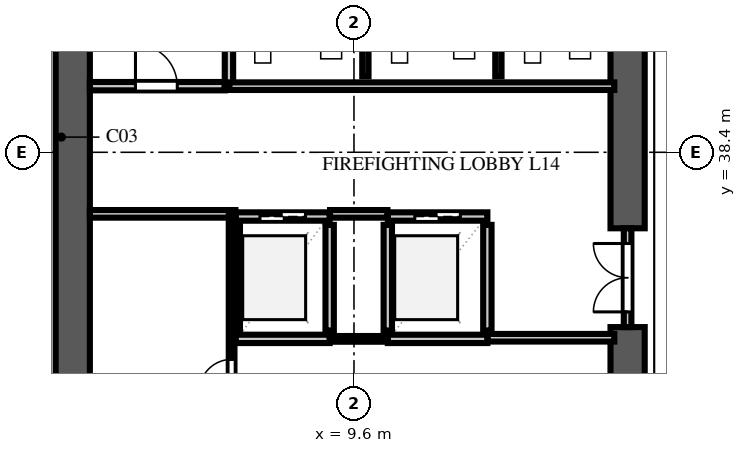
"""IFC4 building model, lengths in metres.
Left out: names, types, materials, properties, quantities, classifications, styles, units other than length and angle.
Written with IfcOpenShell. Run it as: python <this file> out.ifc"""

import sys

from ifc_helpers import new_model, si_unit, direction, frame, frame_2d, origin, place, context, subcontext, project, spatial, rectangle, extrude, element, fill, save


model = new_model("IFC4")
c1 = context("Model", 3, precision=1e-05, world=origin(), true_north=direction((0.0, 1.0)))
c2 = subcontext(c1, "Body", "Model", "MODEL_VIEW")
j1 = project(units=[si_unit("LENGTHUNIT", "METRE"), si_unit("PLANEANGLEUNIT", "RADIAN")], contexts=[c1])
p1 = place(None, origin())
s1 = spatial("IfcSite", under=j1, at=p1, CompositionType="ELEMENT")
p2 = place(p1, origin())
s2 = spatial("IfcBuilding", under=s1, at=p2, CompositionType="ELEMENT")
p3 = place(p2, frame((0.0, 0.0, 58.4)))
s3 = spatial("IfcBuildingStorey", under=s2, at=p3, CompositionType="ELEMENT", Elevation=58.4)
p4 = place(p3, frame((2.2, 9.15, 0.0), z_axis=(0.0, 0.0, 1.0), x_axis=(0.0, 1.0, 0.0)))
e1 = element("IfcWall", 1, at=p4, inside=s3, PredefinedType="SHEAR", context=c2, shape_type="SweptSolid", body=[
    extrude(rectangle(XDim=39.3, YDim=0.9, at=frame_2d((19.65, 0.0))), origin(), (0.0, 0.0, 1.0), 3.54),
])
p5 = place(p3, frame((16.8, 26.0, 0.0), z_axis=(0.0, 0.0, 1.0), x_axis=(0.0, 1.0, 0.0)))
e2 = element("IfcWall", 2, at=p5, inside=s3, PredefinedType="SHEAR", context=c2, shape_type="SweptSolid", body=[
    extrude(rectangle(XDim=7.8, YDim=0.9, at=frame_2d((3.9, 0.0))), origin(), (0.0, 0.0, 1.0), 3.54),
])
p6 = place(p3, frame((16.8, 36.4, 0.0), z_axis=(0.0, 0.0, 1.0), x_axis=(0.0, 1.0, 0.0)))
e3 = element("IfcWall", 3, at=p6, inside=s3, PredefinedType="SHEAR", context=c2, shape_type="SweptSolid", body=[
    extrude(rectangle(XDim=11.15, YDim=0.9, at=frame_2d((5.575, 0.0))), origin(), (0.0, 0.0, 1.0), 3.54),
])
p7 = place(p6, frame((9.2, 0.0, 0.0)))
e4 = element("IfcOpeningElement", 4, at=p7, cuts=e3, PredefinedType="OPENING", context=c2, shape_type="SweptSolid", body=[
    extrude(rectangle(XDim=0.95, YDim=2.15, at=frame_2d((0.475, 1.075))), frame((0.0, 0.462, 0.0), z_axis=(0.0, -1.0, 0.0), x_axis=(1.0, 0.0, 0.0)), (0.0, 0.0, 1.0), 0.924),
])
p8 = place(p3, frame((2.65, 40.14, 0.0), z_axis=(0.0, 0.0, 1.0), x_axis=(1.0, 0.0, 0.0)))
e5 = element("IfcWall", 5, at=p8, inside=s3, PredefinedType="SOLIDWALL", context=c2, shape_type="SweptSolid", body=[
    extrude(rectangle(XDim=3.55, YDim=0.22, at=frame_2d((1.775, 0.0))), origin(), (0.0, 0.0, 1.0), 3.54),
])
p9 = place(p8, frame((1.2, 0.0, 0.0)))
e6 = element("IfcOpeningElement", 6, at=p9, cuts=e5, PredefinedType="OPENING", context=c2, shape_type="SweptSolid", body=[
    extrude(rectangle(XDim=1.1, YDim=2.2, at=frame_2d((0.55, 1.1))), frame((0.0, 0.122, 0.0), z_axis=(0.0, -1.0, 0.0), x_axis=(1.0, 0.0, 0.0)), (0.0, 0.0, 1.0), 0.244),
])
p10 = place(p3, frame((6.31, 40.14, 0.0), z_axis=(0.0, 0.0, 1.0), x_axis=(0.0, 1.0, 0.0)))
e7 = element("IfcWall", 7, at=p10, inside=s3, PredefinedType="SOLIDWALL", context=c2, shape_type="SweptSolid", body=[
    extrude(rectangle(XDim=7.81, YDim=0.22, at=frame_2d((3.905, 0.0))), origin(), (0.0, 0.0, 1.0), 3.54),
])
for number, where, z_axis, x_axis in (
    (8, (6.49, 33.71, 0.0), (0.0, 0.0, 1.0), (0.0, 1.0, 0.0)),
    (9, (8.96, 33.71, 0.0), (0.0, 0.0, 1.0), (0.0, 1.0, 0.0)),
):
    element("IfcWall", number, at=place(p3, frame(where, z_axis=z_axis, x_axis=x_axis)), inside=s3, PredefinedType="SOLIDWALL", context=c2, shape_type="SweptSolid", body=[
        extrude(rectangle(XDim=2.78, YDim=0.22, at=frame_2d((1.39, 0.0))), origin(), (0.0, 0.0, 1.0), 3.54),
    ])
p11 = place(p3, frame((6.49, 33.49, 0.0), z_axis=(0.0, 0.0, 1.0), x_axis=(1.0, 0.0, 0.0)))
e10 = element("IfcWall", 10, at=p11, inside=s3, PredefinedType="SOLIDWALL", context=c2, shape_type="SweptSolid", body=[
    extrude(rectangle(XDim=2.47, YDim=0.22, at=frame_2d((1.235, 0.0))), origin(), (0.0, 0.0, 1.0), 3.54),
])
p12 = place(p3, frame((6.49, 36.71, 0.0), z_axis=(0.0, 0.0, 1.0), x_axis=(1.0, 0.0, 0.0)))
e11 = element("IfcWall", 11, at=p12, inside=s3, PredefinedType="SOLIDWALL", context=c2, shape_type="SweptSolid", body=[
    extrude(rectangle(XDim=2.47, YDim=0.22, at=frame_2d((1.235, 0.0))), origin(), (0.0, 0.0, 1.0), 3.54),
])
p13 = place(p12, frame((0.635, 0.0, 0.0)))
e12 = element("IfcOpeningElement", 12, at=p13, cuts=e11, PredefinedType="OPENING", context=c2, shape_type="SweptSolid", body=[
    extrude(rectangle(XDim=1.2, YDim=2.2, at=frame_2d((0.6, 1.1))), frame((0.0, 0.122, 0.0), z_axis=(0.0, -1.0, 0.0), x_axis=(1.0, 0.0, 0.0)), (0.0, 0.0, 1.0), 0.244),
])
for number, where, z_axis, x_axis in (
    (13, (10.49, 33.71, 0.0), (0.0, 0.0, 1.0), (0.0, 1.0, 0.0)),
    (14, (13.11, 33.71, 0.0), (0.0, 0.0, 1.0), (0.0, 1.0, 0.0)),
):
    element("IfcWall", number, at=place(p3, frame(where, z_axis=z_axis, x_axis=x_axis)), inside=s3, PredefinedType="SOLIDWALL", context=c2, shape_type="SweptSolid", body=[
        extrude(rectangle(XDim=2.78, YDim=0.22, at=frame_2d((1.39, 0.0))), origin(), (0.0, 0.0, 1.0), 3.54),
    ])
p14 = place(p3, frame((10.49, 33.49, 0.0), z_axis=(0.0, 0.0, 1.0), x_axis=(1.0, 0.0, 0.0)))
e15 = element("IfcWall", 15, at=p14, inside=s3, PredefinedType="SOLIDWALL", context=c2, shape_type="SweptSolid", body=[
    extrude(rectangle(XDim=2.62, YDim=0.22, at=frame_2d((1.31, 0.0))), origin(), (0.0, 0.0, 1.0), 3.54),
])
p15 = place(p3, frame((10.49, 36.71, 0.0), z_axis=(0.0, 0.0, 1.0), x_axis=(1.0, 0.0, 0.0)))
e16 = element("IfcWall", 16, at=p15, inside=s3, PredefinedType="SOLIDWALL", context=c2, shape_type="SweptSolid", body=[
    extrude(rectangle(XDim=2.62, YDim=0.22, at=frame_2d((1.31, 0.0))), origin(), (0.0, 0.0, 1.0), 3.54),
])
p16 = place(p15, frame((0.71, 0.0, 0.0)))
e17 = element("IfcOpeningElement", 17, at=p16, cuts=e16, PredefinedType="OPENING", context=c2, shape_type="SweptSolid", body=[
    extrude(rectangle(XDim=1.2, YDim=2.2, at=frame_2d((0.6, 1.1))), frame((0.0, 0.122, 0.0), z_axis=(0.0, -1.0, 0.0), x_axis=(1.0, 0.0, 0.0)), (0.0, 0.0, 1.0), 0.244),
])
p17 = place(p3, frame((2.65, 36.78, 0.0), z_axis=(0.0, 0.0, 1.0), x_axis=(1.0, 0.0, 0.0)))
e18 = element("IfcWall", 18, at=p17, inside=s3, PredefinedType="SOLIDWALL", context=c2, shape_type="SweptSolid", body=[
    extrude(rectangle(XDim=3.83, YDim=0.2, at=frame_2d((1.915, 0.0))), origin(), (0.0, 0.0, 1.0), 3.54),
])
p18 = place(p3, frame((8.97, 36.78, 0.0), z_axis=(0.0, 0.0, 1.0), x_axis=(1.0, 0.0, 0.0)))
e19 = element("IfcWall", 19, at=p18, inside=s3, PredefinedType="SOLIDWALL", context=c2, shape_type="SweptSolid", body=[
    extrude(rectangle(XDim=1.51, YDim=0.2, at=frame_2d((0.755, 0.0))), origin(), (0.0, 0.0, 1.0), 3.54),
])
p19 = place(p3, frame((13.12, 33.52, 0.0), z_axis=(0.0, 0.0, 1.0), x_axis=(1.0, 0.0, 0.0)))
e20 = element("IfcWall", 20, at=p19, inside=s3, PredefinedType="SOLIDWALL", context=c2, shape_type="SweptSolid", body=[
    extrude(rectangle(XDim=3.33, YDim=0.2, at=frame_2d((1.665, 0.0))), origin(), (0.0, 0.0, 1.0), 3.54),
])
p20 = place(p3, frame((6.32, 40.14, 0.0), z_axis=(0.0, 0.0, 1.0), x_axis=(1.0, 0.0, 0.0)))
e21 = element("IfcWall", 21, at=p20, inside=s3, PredefinedType="SOLIDWALL", context=c2, shape_type="SweptSolid", body=[
    extrude(rectangle(XDim=10.13, YDim=0.2, at=frame_2d((5.065, 0.0))), origin(), (0.0, 0.0, 1.0), 3.54),
])
p21 = place(p3, frame((16.8, 33.8, 0.0), z_axis=(0.0, 0.0, 1.0), x_axis=(0.0, 1.0, 0.0)))
e22 = element("IfcWall", 22, at=p21, inside=s3, PredefinedType="SOLIDWALL", context=c2, shape_type="SweptSolid", body=[
    extrude(rectangle(XDim=2.6, YDim=0.2, at=frame_2d((1.3, 0.0))), origin(), (0.0, 0.0, 1.0), 3.54),
])
p22 = place(p21, frame((0.4, 0.0, 0.0)))
e23 = element("IfcOpeningElement", 23, at=p22, cuts=e22, PredefinedType="OPENING", context=c2, shape_type="SweptSolid", body=[
    extrude(rectangle(XDim=1.8, YDim=2.2, at=frame_2d((0.9, 1.1))), frame((0.0, 0.112, 0.0), z_axis=(0.0, -1.0, 0.0), x_axis=(1.0, 0.0, 0.0)), (0.0, 0.0, 1.0), 0.224),
])
p23 = place(p3, frame((8.965, 33.49, 0.0), z_axis=(0.0, 0.0, 1.0), x_axis=(1.0, 0.0, 0.0)))
e24 = element("IfcWall", 24, at=p23, inside=s3, PredefinedType="PARTITIONING", context=c2, shape_type="SweptSolid", body=[
    extrude(rectangle(XDim=1.52, YDim=0.15, at=frame_2d((0.76, 0.0))), origin(), (0.0, 0.0, 1.0), 3.54),
])
p24 = place(p3, frame((6.38, 17.8, 0.0), z_axis=(0.0, 0.0, 1.0), x_axis=(0.0, 1.0, 0.0)))
e25 = element("IfcWall", 25, at=p24, inside=s3, PredefinedType="PARTITIONING", context=c2, shape_type="SweptSolid", body=[
    extrude(rectangle(XDim=18.98, YDim=0.15, at=frame_2d((9.49, 0.0))), origin(), (0.0, 0.0, 1.0), 3.54),
])
p25 = place(p24, frame((14.3, 0.0, 0.0)))
e26 = element("IfcOpeningElement", 26, at=p25, cuts=e25, PredefinedType="OPENING", context=c2, shape_type="SweptSolid", body=[
    extrude(rectangle(XDim=0.85, YDim=2.1, at=frame_2d((0.425, 1.05))), frame((0.0, 0.087, 0.0), z_axis=(0.0, -1.0, 0.0), x_axis=(1.0, 0.0, 0.0)), (0.0, 0.0, 1.0), 0.174),
])
for number, where, z_axis, x_axis in (
    (27, (9.9, 40.4, 0.0), (0.0, 0.0, 1.0), (0.0, 1.0, 0.0)),
    (28, (13.4, 40.4, 0.0), (0.0, 0.0, 1.0), (0.0, 1.0, 0.0)),
):
    element("IfcWall", number, at=place(p3, frame(where, z_axis=z_axis, x_axis=x_axis)), inside=s3, PredefinedType="PLUMBINGWALL", context=c2, shape_type="SweptSolid", body=[
        extrude(rectangle(XDim=4.92, YDim=0.165, at=frame_2d((2.46, 0.0))), origin(), (0.0, 0.0, 1.0), 3.54),
    ])
p26 = place(p9, origin())
e29 = element("IfcDoor", 29, at=p26, inside=s3, OperationType="SINGLE_SWING_LEFT", PredefinedType="DOOR", context=c2, shape_type="SweptSolid", body=[
    extrude(rectangle(XDim=1.1, YDim=2.2, at=frame_2d((0.55, 1.1))), frame((0.0, 0.025, 0.0), z_axis=(0.0, -1.0, 0.0), x_axis=(1.0, 0.0, 0.0)), (0.0, 0.0, 1.0), 0.05),
])
fill(e6, e29)
p27 = place(p13, origin())
e30 = element("IfcDoor", 30, at=p27, inside=s3, OperationType="DOUBLE_DOOR_SLIDING", PredefinedType="DOOR", context=c2, shape_type="SweptSolid", body=[
    extrude(rectangle(XDim=1.2, YDim=2.2, at=frame_2d((0.6, 1.1))), frame((0.0, 0.025, 0.0), z_axis=(0.0, -1.0, 0.0), x_axis=(1.0, 0.0, 0.0)), (0.0, 0.0, 1.0), 0.05),
])
fill(e12, e30)
p28 = place(p16, origin())
e31 = element("IfcDoor", 31, at=p28, inside=s3, OperationType="DOUBLE_DOOR_SLIDING", PredefinedType="DOOR", context=c2, shape_type="SweptSolid", body=[
    extrude(rectangle(XDim=1.2, YDim=2.2, at=frame_2d((0.6, 1.1))), frame((0.0, 0.025, 0.0), z_axis=(0.0, -1.0, 0.0), x_axis=(1.0, 0.0, 0.0)), (0.0, 0.0, 1.0), 0.05),
])
fill(e17, e31)
p29 = place(p22, origin())
e32 = element("IfcDoor", 32, at=p29, inside=s3, OperationType="DOUBLE_DOOR_SINGLE_SWING", PredefinedType="DOOR", context=c2, shape_type="SweptSolid", body=[
    extrude(rectangle(XDim=1.8, YDim=2.2, at=frame_2d((0.9, 1.1))), frame((0.0, 0.025, 0.0), z_axis=(0.0, -1.0, 0.0), x_axis=(1.0, 0.0, 0.0)), (0.0, 0.0, 1.0), 0.05),
])
fill(e23, e32)
p30 = place(p25, origin())
e33 = element("IfcDoor", 33, at=p30, inside=s3, OperationType="SINGLE_SWING_LEFT", PredefinedType="DOOR", context=c2, shape_type="SweptSolid", body=[
    extrude(rectangle(XDim=0.85, YDim=2.1, at=frame_2d((0.425, 1.05))), frame((0.0, 0.025, 0.0), z_axis=(0.0, -1.0, 0.0), x_axis=(1.0, 0.0, 0.0)), (0.0, 0.0, 1.0), 0.05),
])
fill(e26, e33)
save(model, sys.argv[1])
